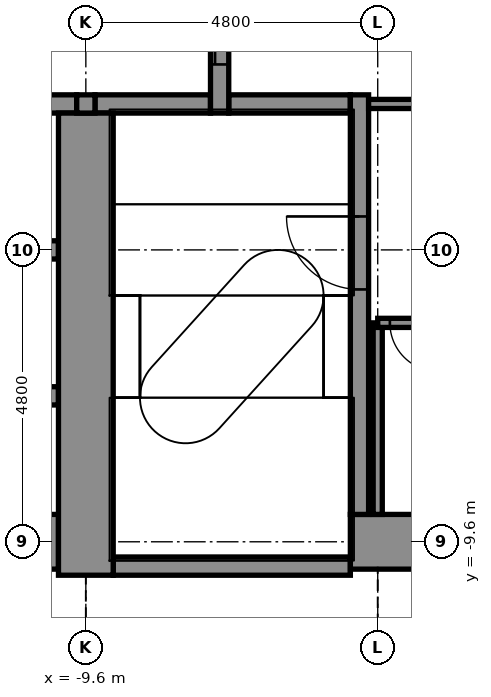
"""IFC4 building model, lengths in metres.
Left out: names, types, materials, properties, quantities, classifications, styles, units other than length and angle.
Written with IfcOpenShell. Run it as: python <this file> out.ifc"""

import sys

from ifc_helpers import new_model, si_unit, direction, frame, frame_2d, origin, place, context, subcontext, project, spatial, rectangle, extrude, element, fill, save


model = new_model("IFC4")
c1 = context("Model", 3, precision=1e-05, world=origin(), true_north=direction((0.0, 1.0)))
c2 = subcontext(c1, "Body", "Model", "MODEL_VIEW")
j1 = project(units=[si_unit("LENGTHUNIT", "METRE"), si_unit("PLANEANGLEUNIT", "RADIAN")], contexts=[c1])
p1 = place(None, origin())
s1 = spatial("IfcSite", under=j1, at=p1, CompositionType="ELEMENT")
p2 = place(p1, origin())
s2 = spatial("IfcBuilding", under=s1, at=p2, CompositionType="ELEMENT")
p3 = place(p2, frame((0.0, 0.0, 91.4)))
s3 = spatial("IfcBuildingStorey", under=s2, at=p3, CompositionType="ELEMENT", Elevation=91.4)
p4 = place(p3, frame((-9.15, -10.0, -0.2), z_axis=(0.0, 0.0, 1.0), x_axis=(1.0, 0.0, 0.0)))
e1 = element("IfcWall", 1, at=p4, inside=s3, PredefinedType="STANDARD", context=c2, shape_type="SweptSolid", body=[
    extrude(rectangle(XDim=3.9, YDim=0.3, at=frame_2d((1.95, 0.0))), origin(), (0.0, 0.0, 1.0), 4.5),
])
p5 = place(p3, frame((-13.95, -9.6, -0.2), z_axis=(0.0, 0.0, 1.0), x_axis=(1.0, 0.0, 0.0)))
e2 = element("IfcWall", 2, at=p5, inside=s3, PredefinedType="SHEAR", context=c2, shape_type="SweptSolid", body=[
    extrude(rectangle(XDim=3.9, YDim=0.9, at=frame_2d((1.95, 0.0))), origin(), (0.0, 0.0, 1.0), 4.5),
])
p6 = place(p5, frame((1.5, 0.0, 0.2)))
e3 = element("IfcOpeningElement", 3, at=p6, cuts=e2, PredefinedType="OPENING", context=c2, shape_type="SweptSolid", body=[
    extrude(rectangle(XDim=0.9, YDim=2.1, at=frame_2d((0.45, 1.05))), frame((0.0, 0.46, 0.0), z_axis=(0.0, -1.0, 0.0), x_axis=(1.0, 0.0, 0.0)), (0.0, 0.0, 1.0), 0.92),
])
p7 = place(p3, frame((-5.25, -9.6, -0.2), z_axis=(0.0, 0.0, 1.0), x_axis=(1.0, 0.0, 0.0)))
e4 = element("IfcWall", 4, at=p7, inside=s3, PredefinedType="SHEAR", context=c2, shape_type="SweptSolid", body=[
    extrude(rectangle(XDim=10.2, YDim=0.9, at=frame_2d((5.1, 0.0))), origin(), (0.0, 0.0, 1.0), 4.5),
])
p8 = place(p7, frame((9.0, 0.0, 0.2)))
e5 = element("IfcOpeningElement", 5, at=p8, cuts=e4, PredefinedType="OPENING", context=c2, shape_type="SweptSolid", body=[
    extrude(rectangle(XDim=0.9, YDim=2.1, at=frame_2d((0.45, 1.05))), frame((0.0, 0.46, 0.0), z_axis=(0.0, -1.0, 0.0), x_axis=(1.0, 0.0, 0.0)), (0.0, 0.0, 1.0), 0.92),
])
for number, where, z_axis, x_axis in (
    (6, (-13.95, -7.2, -0.2), (0.0, 0.0, 1.0), (1.0, 0.0, 0.0)),
    (7, (-13.95, -4.8, -0.2), (0.0, 0.0, 1.0), (1.0, 0.0, 0.0)),
):
    element("IfcWall", number, at=place(p3, frame(where, z_axis=z_axis, x_axis=x_axis)), inside=s3, PredefinedType="STANDARD", context=c2, shape_type="SweptSolid", body=[
        extrude(rectangle(XDim=3.9, YDim=0.3, at=frame_2d((1.95, 0.0))), origin(), (0.0, 0.0, 1.0), 4.5),
    ])
p9 = place(p3, frame((-10.85, -2.4, -0.2), z_axis=(0.0, 0.0, 1.0), x_axis=(1.0, 0.0, 0.0)))
e8 = element("IfcWall", 8, at=p9, inside=s3, PredefinedType="STANDARD", context=c2, shape_type="SweptSolid", body=[
    extrude(rectangle(XDim=1.1, YDim=0.3, at=frame_2d((0.55, 0.0))), origin(), (0.0, 0.0, 1.0), 4.5),
])
p10 = place(p3, frame((-9.45, -2.4, -0.2), z_axis=(0.0, 0.0, 1.0), x_axis=(1.0, 0.0, 0.0)))
e9 = element("IfcWall", 9, at=p10, inside=s3, PredefinedType="STANDARD", context=c2, shape_type="SweptSolid", body=[
    extrude(rectangle(XDim=1.9, YDim=0.3, at=frame_2d((0.95, 0.0))), origin(), (0.0, 0.0, 1.0), 4.5),
])
p11 = place(p3, frame((-7.25, -2.4, -0.2), z_axis=(0.0, 0.0, 1.0), x_axis=(1.0, 0.0, 0.0)))
e10 = element("IfcWall", 10, at=p11, inside=s3, PredefinedType="STANDARD", context=c2, shape_type="SweptSolid", body=[
    extrude(rectangle(XDim=2.0, YDim=0.3, at=frame_2d((1.0, 0.0))), origin(), (0.0, 0.0, 1.0), 4.5),
])
p12 = place(p3, frame((-9.6, -10.15, -0.2), z_axis=(0.0, 0.0, 1.0), x_axis=(0.0, 1.0, 0.0)))
e11 = element("IfcWall", 11, at=p12, inside=s3, PredefinedType="SHEAR", context=c2, shape_type="SweptSolid", body=[
    extrude(rectangle(XDim=7.6, YDim=0.9, at=frame_2d((3.8, 0.0))), origin(), (0.0, 0.0, 1.0), 4.5),
])
p13 = place(p3, frame((-9.6, -2.55, -0.2), z_axis=(0.0, 0.0, 1.0), x_axis=(0.0, 1.0, 0.0)))
e12 = element("IfcWall", 12, at=p13, inside=s3, PredefinedType="STANDARD", context=c2, shape_type="SweptSolid", body=[
    extrude(rectangle(XDim=0.3, YDim=0.3, at=frame_2d((0.15, 0.0))), origin(), (0.0, 0.0, 1.0), 4.5),
])
p14 = place(p3, frame((-7.4, -2.55, -0.2), z_axis=(0.0, 0.0, 1.0), x_axis=(0.0, 1.0, 0.0)))
e13 = element("IfcWall", 13, at=p14, inside=s3, PredefinedType="STANDARD", context=c2, shape_type="SweptSolid", body=[
    extrude(rectangle(XDim=5.1, YDim=0.3, at=frame_2d((2.55, 0.0))), origin(), (0.0, 0.0, 1.0), 4.5),
])
p15 = place(p14, frame((0.8, 0.0, 0.2)))
e14 = element("IfcOpeningElement", 14, at=p15, cuts=e13, PredefinedType="OPENING", context=c2, shape_type="SweptSolid", body=[
    extrude(rectangle(XDim=1.1, YDim=2.1, at=frame_2d((0.55, 1.05))), frame((0.0, 0.16, 0.0), z_axis=(0.0, -1.0, 0.0), x_axis=(1.0, 0.0, 0.0)), (0.0, 0.0, 1.0), 0.32),
])
p16 = place(p14, frame((3.2, 0.0, 0.2)))
e15 = element("IfcOpeningElement", 15, at=p16, cuts=e13, PredefinedType="OPENING", context=c2, shape_type="SweptSolid", body=[
    extrude(rectangle(XDim=1.1, YDim=2.1, at=frame_2d((0.55, 1.05))), frame((0.0, 0.16, 0.0), z_axis=(0.0, -1.0, 0.0), x_axis=(1.0, 0.0, 0.0)), (0.0, 0.0, 1.0), 0.32),
])
p17 = place(p3, frame((-5.1, -9.15, -0.2), z_axis=(0.0, 0.0, 1.0), x_axis=(0.0, 1.0, 0.0)))
e16 = element("IfcWall", 16, at=p17, inside=s3, PredefinedType="STANDARD", context=c2, shape_type="SweptSolid", body=[
    extrude(rectangle(XDim=6.9, YDim=0.3, at=frame_2d((3.45, 0.0))), origin(), (0.0, 0.0, 1.0), 4.5),
])
p18 = place(p17, frame((3.7, 0.0, 0.2)))
e17 = element("IfcOpeningElement", 17, at=p18, cuts=e16, PredefinedType="OPENING", context=c2, shape_type="SweptSolid", body=[
    extrude(rectangle(XDim=1.2, YDim=2.1, at=frame_2d((0.6, 1.05))), frame((0.0, 0.16, 0.0), z_axis=(0.0, -1.0, 0.0), x_axis=(1.0, 0.0, 0.0)), (0.0, 0.0, 1.0), 0.32),
])
p19 = place(p3, frame((-4.8, -9.15, 0.0), z_axis=(0.0, 0.0, 1.0), x_axis=(0.0, 1.0, 0.0)))
e18 = element("IfcWall", 18, at=p19, inside=s3, PredefinedType="PARTITIONING", context=c2, shape_type="SweptSolid", body=[
    extrude(rectangle(XDim=3.15, YDim=0.15, at=frame_2d((1.575, 0.0))), origin(), (0.0, 0.0, 1.0), 4.3),
])
p20 = place(p3, frame((-4.8, -6.0, 0.0), z_axis=(0.0, 0.0, 1.0), x_axis=(1.0, 0.0, 0.0)))
e19 = element("IfcWall", 19, at=p20, inside=s3, PredefinedType="PARTITIONING", context=c2, shape_type="SweptSolid", body=[
    extrude(rectangle(XDim=1.05, YDim=0.15, at=frame_2d((0.525, 0.0))), origin(), (0.0, 0.0, 1.0), 4.3),
])
p21 = place(p20, frame((0.2, 0.0, 0.0)))
e20 = element("IfcOpeningElement", 20, at=p21, cuts=e19, PredefinedType="OPENING", context=c2, shape_type="SweptSolid", body=[
    extrude(rectangle(XDim=0.8, YDim=2.1, at=frame_2d((0.4, 1.05))), frame((0.0, 0.085, 0.0), z_axis=(0.0, -1.0, 0.0), x_axis=(1.0, 0.0, 0.0)), (0.0, 0.0, 1.0), 0.17),
])
p22 = place(p3, frame((-4.95, -2.4, 0.0), z_axis=(0.0, 0.0, 1.0), x_axis=(1.0, 0.0, 0.0)))
e21 = element("IfcWall", 21, at=p22, inside=s3, PredefinedType="PARTITIONING", context=c2, shape_type="SweptSolid", body=[
    extrude(rectangle(XDim=1.2, YDim=0.15, at=frame_2d((0.6, 0.0))), origin(), (0.0, 0.0, 1.0), 4.3),
])
p23 = place(p21, frame((0.8, 0.0, 0.0), z_axis=(0.0, 0.0, 1.0), x_axis=(-1.0, 0.0, 0.0)))
e22 = element("IfcDoor", 22, at=p23, inside=s3, OperationType="SINGLE_SWING_RIGHT", PredefinedType="DOOR", context=c2, shape_type="SweptSolid", body=[
    extrude(rectangle(XDim=0.8, YDim=2.1, at=frame_2d((0.4, 1.05))), frame((0.0, 0.025, 0.0), z_axis=(0.0, -1.0, 0.0), x_axis=(1.0, 0.0, 0.0)), (0.0, 0.0, 1.0), 0.05),
])
fill(e20, e22)
p24 = place(p15, origin())
e23 = element("IfcDoor", 23, at=p24, inside=s3, OperationType="DOUBLE_DOOR_SLIDING", PredefinedType="DOOR", context=c2, shape_type="SweptSolid", body=[
    extrude(rectangle(XDim=1.1, YDim=2.1, at=frame_2d((0.55, 1.05))), frame((0.0, 0.025, 0.0), z_axis=(0.0, -1.0, 0.0), x_axis=(1.0, 0.0, 0.0)), (0.0, 0.0, 1.0), 0.05),
])
fill(e14, e23)
p25 = place(p18, origin())
e24 = element("IfcDoor", 24, at=p25, inside=s3, OperationType="SINGLE_SWING_RIGHT", PredefinedType="DOOR", context=c2, shape_type="SweptSolid", body=[
    extrude(rectangle(XDim=1.2, YDim=2.1, at=frame_2d((0.6, 1.05))), frame((0.0, 0.025, 0.0), z_axis=(0.0, -1.0, 0.0), x_axis=(1.0, 0.0, 0.0)), (0.0, 0.0, 1.0), 0.05),
])
fill(e17, e24)
save(model, sys.argv[1])
